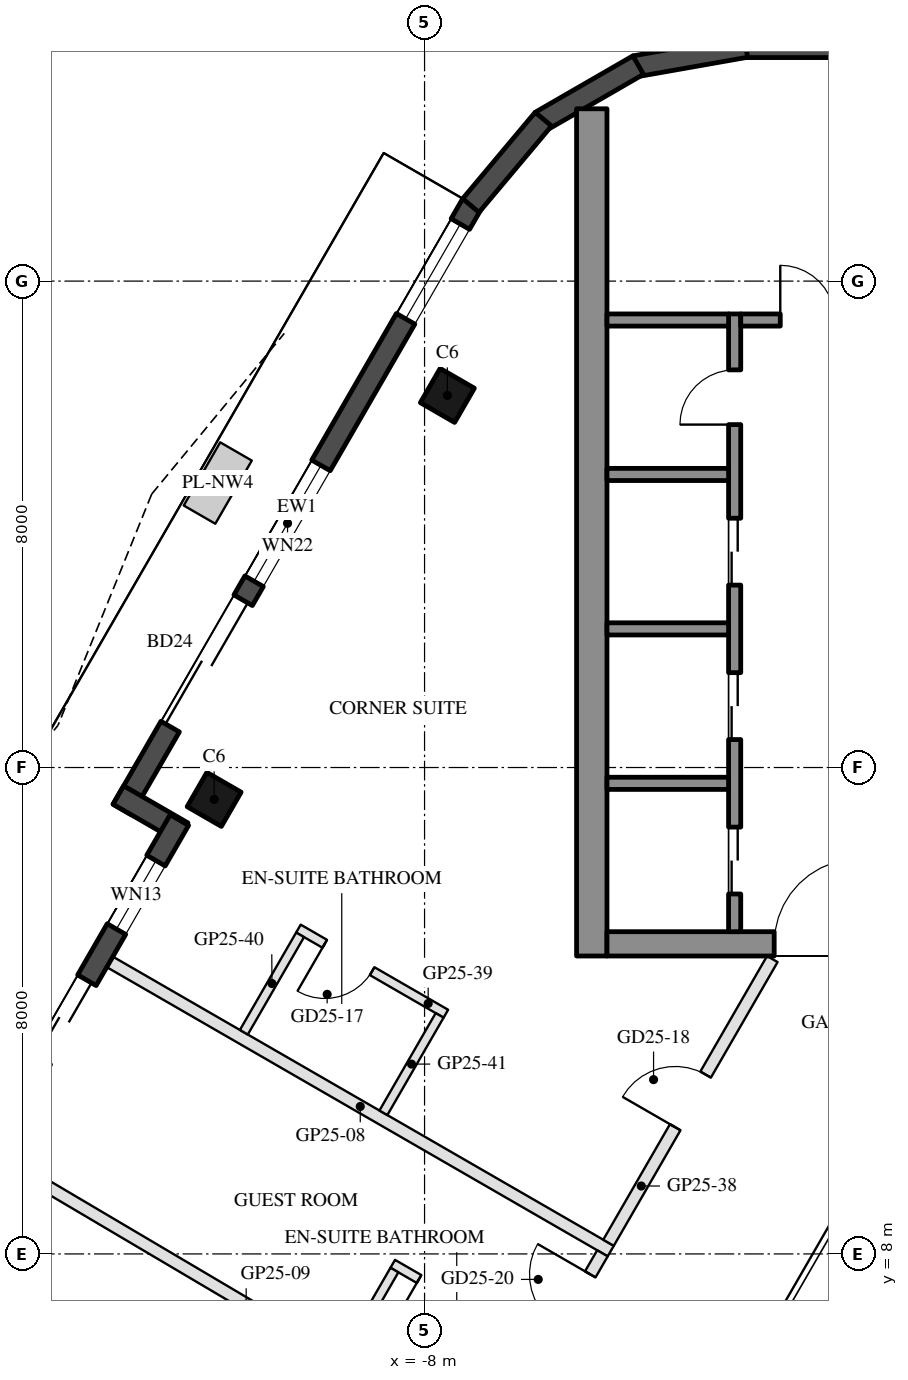
"""IFC4 building model, lengths in metres.
Left out: names, types, materials, properties, quantities, classifications, styles, units other than length and angle.
Written with IfcOpenShell. Run it as: python <this file> out.ifc"""

import sys

from ifc_helpers import new_model, si_unit, direction, frame, frame_2d, origin, origin_2d, place, context, subcontext, project, spatial, rectangle, hollow_rectangle, extrude, boolean, halfspace, element, fill, save


model = new_model("IFC4")
c1 = context("Model", 3, precision=1e-05, world=origin(), true_north=direction((0.0, 1.0)))
c2 = subcontext(c1, "Body", "Model", "MODEL_VIEW")
j1 = project(units=[si_unit("LENGTHUNIT", "METRE"), si_unit("PLANEANGLEUNIT", "RADIAN")], contexts=[c1])
p1 = place(None, origin())
s1 = spatial("IfcSite", under=j1, at=p1, CompositionType="ELEMENT")
p2 = place(p1, origin())
s2 = spatial("IfcBuilding", under=s1, at=p2, CompositionType="ELEMENT")
p3 = place(p2, frame((0.0, 0.0, 257.8)))
s3 = spatial("IfcBuildingStorey", under=s2, at=p3, CompositionType="ELEMENT", Elevation=257.8)
p4 = place(p3, frame((-7.625, 22.119, 0.0), z_axis=(0.0, 0.0, 1.0), x_axis=(0.5, 0.866025403784, 0.0)))
e1 = element("IfcColumn", 1, at=p4, inside=s3, PredefinedType="COLUMN", context=c2, shape_type="SweptSolid", body=[
    boolean("DIFFERENCE", extrude(hollow_rectangle(XDim=0.65, YDim=0.65, WallThickness=0.03, at=origin_2d()), origin(), (0.0, 0.0, 1.0), 3.7), halfspace(frame((0.0, 0.0, 0.047), z_axis=(0.0, 0.0, 1.0), x_axis=(1.0, 0.0, 0.0)), True)),
])
p5 = place(p3, frame((-11.461, 15.475, 0.0), z_axis=(0.0, 0.0, 1.0), x_axis=(0.5, 0.866025403784, 0.0)))
e2 = element("IfcColumn", 2, at=p5, inside=s3, PredefinedType="COLUMN", context=c2, shape_type="SweptSolid", body=[
    boolean("DIFFERENCE", extrude(hollow_rectangle(XDim=0.65, YDim=0.65, WallThickness=0.03, at=origin_2d()), origin(), (0.0, 0.0, 1.0), 3.7), halfspace(frame((0.0, 0.0, 0.04), z_axis=(0.0, 0.0, 1.0), x_axis=(1.0, 0.0, 0.0)), True)),
])
p6 = place(p3, frame((-7.221, 25.268, 0.0), z_axis=(0.0, 0.0, 1.0), x_axis=(-0.499999932627, -0.866025442683, 0.0)))
e3 = element("IfcWall", 3, at=p6, inside=s3, PredefinedType="SOLIDWALL", context=c2, shape_type="SweptSolid", body=[
    extrude(rectangle(XDim=11.5, YDim=0.35, at=frame_2d((5.75, 0.0))), origin(), (0.0, 0.0, 1.0), 3.55),
])
p7 = place(p6, frame((0.381, 0.0, 0.3)))
e4 = element("IfcOpeningElement", 4, at=p7, cuts=e3, PredefinedType="OPENING", context=c2, shape_type="SweptSolid", body=[
    extrude(rectangle(XDim=1.8, YDim=2.65, at=frame_2d((0.9, 1.325))), frame((0.0, 0.185, 0.0), z_axis=(0.0, -1.0, 0.0), x_axis=(1.0, 0.0, 0.0)), (0.0, 0.0, 1.0), 0.37),
])
p8 = place(p6, frame((7.525, 0.0, 0.0)))
e5 = element("IfcOpeningElement", 5, at=p8, cuts=e3, PredefinedType="OPENING", context=c2, shape_type="SweptSolid", body=[
    extrude(rectangle(XDim=2.4, YDim=2.4, at=frame_2d((1.2, 1.2))), frame((0.0, 0.185, 0.0), z_axis=(0.0, -1.0, 0.0), x_axis=(1.0, 0.0, 0.0)), (0.0, 0.0, 1.0), 0.37),
])
p9 = place(p6, frame((4.964, 0.0, 0.3)))
e6 = element("IfcOpeningElement", 6, at=p9, cuts=e3, PredefinedType="OPENING", context=c2, shape_type="SweptSolid", body=[
    extrude(rectangle(XDim=2.2, YDim=2.65, at=frame_2d((1.1, 1.325))), frame((0.0, 0.185, 0.0), z_axis=(0.0, -1.0, 0.0), x_axis=(1.0, 0.0, 0.0)), (0.0, 0.0, 1.0), 0.37),
])
p10 = place(p3, frame((-13.036, 15.548, 0.0), z_axis=(0.0, 0.0, 1.0), x_axis=(0.866005645448, -0.500034220881, 0.0)))
e7 = element("IfcWall", 7, at=p10, inside=s3, PredefinedType="SOLIDWALL", context=c2, shape_type="SweptSolid", body=[
    extrude(rectangle(XDim=1.22, YDim=0.35, at=frame_2d((0.61, 0.0))), origin(), (0.0, 0.0, 1.0), 3.55),
])
p11 = place(p3, frame((-12.032, 15.136, 0.0), z_axis=(0.0, 0.0, 1.0), x_axis=(-0.500005870429, -0.866022014464, 0.0)))
e8 = element("IfcWall", 8, at=p11, inside=s3, PredefinedType="SOLIDWALL", context=c2, shape_type="SweptSolid", body=[
    extrude(rectangle(XDim=6.512, YDim=0.35, at=frame_2d((3.256, 0.0))), origin(), (0.0, 0.0, 1.0), 3.55),
])
p12 = place(p11, frame((0.77, 0.0, 0.3)))
e9 = element("IfcOpeningElement", 9, at=p12, cuts=e8, PredefinedType="OPENING", context=c2, shape_type="SweptSolid", body=[
    extrude(rectangle(XDim=1.3, YDim=2.65, at=frame_2d((0.65, 1.325))), frame((0.0, 0.185, 0.0), z_axis=(0.0, -1.0, 0.0), x_axis=(1.0, 0.0, 0.0)), (0.0, 0.0, 1.0), 0.37),
])
p13 = place(p11, frame((3.042, 0.0, 0.0)))
e10 = element("IfcOpeningElement", 10, at=p13, cuts=e8, PredefinedType="OPENING", context=c2, shape_type="SweptSolid", body=[
    extrude(rectangle(XDim=1.5, YDim=2.4, at=frame_2d((0.75, 1.2))), frame((0.0, 0.185, 0.0), z_axis=(0.0, -1.0, 0.0), x_axis=(1.0, 0.0, 0.0)), (0.0, 0.0, 1.0), 0.37),
])
p14 = place(p11, frame((4.842, 0.0, 0.3)))
e11 = element("IfcOpeningElement", 11, at=p14, cuts=e8, PredefinedType="OPENING", context=c2, shape_type="SweptSolid", body=[
    extrude(rectangle(XDim=1.0, YDim=2.65, at=frame_2d((0.5, 1.325))), frame((0.0, 0.185, 0.0), z_axis=(0.0, -1.0, 0.0), x_axis=(1.0, 0.0, 0.0)), (0.0, 0.0, 1.0), 0.37),
])
p15 = place(p3, frame((2.747, 27.851, 0.0), z_axis=(0.0, 0.0, 1.0), x_axis=(-1.0, 0.0, 0.0)))
e12 = element("IfcWall", 12, at=p15, inside=s3, PredefinedType="SOLIDWALL", context=c2, shape_type="SweptSolid", body=[
    extrude(rectangle(XDim=5.495, YDim=0.35, at=frame_2d((2.747, 0.0))), origin(), (0.0, 0.0, 1.0), 3.55),
])
p16 = place(p3, frame((-2.717, 27.854, 0.0), z_axis=(0.0, 0.0, 1.0), x_axis=(-0.984795480386, -0.173717764815, 0.0)))
e13 = element("IfcWall", 13, at=p16, inside=s3, PredefinedType="SOLIDWALL", context=c2, shape_type="SweptSolid", body=[
    extrude(rectangle(XDim=1.855, YDim=0.35, at=frame_2d((0.928, 0.0))), origin(), (0.0, 0.0, 1.0), 3.55),
])
p17 = place(p3, frame((-4.487, 27.552, 0.0), z_axis=(0.0, 0.0, 1.0), x_axis=(-0.866080385203, -0.499904757295, 0.0)))
e14 = element("IfcWall", 14, at=p17, inside=s3, PredefinedType="SOLIDWALL", context=c2, shape_type="SweptSolid", body=[
    extrude(rectangle(XDim=1.855, YDim=0.35, at=frame_2d((0.927, 0.0))), origin(), (0.0, 0.0, 1.0), 3.55),
])
p18 = place(p3, frame((-6.046, 26.664, 0.0), z_axis=(0.0, 0.0, 1.0), x_axis=(-0.642756798522, -0.7660702957, 0.0)))
e15 = element("IfcWall", 15, at=p18, inside=s3, PredefinedType="SOLIDWALL", context=c2, shape_type="SweptSolid", body=[
    extrude(rectangle(XDim=1.855, YDim=0.35, at=frame_2d((0.928, 0.0))), origin(), (0.0, 0.0, 1.0), 3.55),
])
p19 = place(p3, frame((-5.25, 12.9, 0.0), z_axis=(0.0, 0.0, 1.0), x_axis=(0.0, 1.0, 0.0)))
e16 = element("IfcWall", 16, at=p19, inside=s3, PredefinedType="SHEAR", context=c2, shape_type="SweptSolid", body=[
    extrude(rectangle(XDim=13.934, YDim=0.5, at=frame_2d((6.967, 0.0))), origin(), (0.0, 0.0, 1.0), 3.5),
])
p20 = place(p3, frame((5.0, 13.1, 0.0), z_axis=(0.0, 0.0, 1.0), x_axis=(-1.0, 0.0, 0.0)))
e17 = element("IfcWall", 17, at=p20, inside=s3, PredefinedType="SHEAR", context=c2, shape_type="SweptSolid", body=[
    extrude(rectangle(XDim=10.0, YDim=0.4, at=frame_2d((5.0, 0.0))), origin(), (0.0, 0.0, 1.0), 3.5),
])
p21 = place(p20, frame((3.55, 0.0, 0.0)))
e18 = element("IfcOpeningElement", 18, at=p21, cuts=e17, PredefinedType="OPENING", context=c2, shape_type="SweptSolid", body=[
    extrude(rectangle(XDim=1.1, YDim=2.1, at=frame_2d((0.55, 1.05))), frame((0.0, 0.21, 0.0), z_axis=(0.0, -1.0, 0.0), x_axis=(1.0, 0.0, 0.0)), (0.0, 0.0, 1.0), 0.42),
])
p22 = place(p20, frame((5.85, 0.0, 0.0)))
e19 = element("IfcOpeningElement", 19, at=p22, cuts=e17, PredefinedType="OPENING", context=c2, shape_type="SweptSolid", body=[
    extrude(rectangle(XDim=1.4, YDim=2.1, at=frame_2d((0.7, 1.05))), frame((0.0, 0.21, 0.0), z_axis=(0.0, -1.0, 0.0), x_axis=(1.0, 0.0, 0.0)), (0.0, 0.0, 1.0), 0.42),
])
p23 = place(p3, frame((-2.9, 13.3, 0.0), z_axis=(0.0, 0.0, 1.0), x_axis=(0.0, 1.0, 0.0)))
e20 = element("IfcWall", 20, at=p23, inside=s3, PredefinedType="SHEAR", context=c2, shape_type="SweptSolid", body=[
    extrude(rectangle(XDim=10.16, YDim=0.2, at=frame_2d((5.08, 0.0))), origin(), (0.0, 0.0, 1.0), 3.5),
])
p24 = place(p23, frame((0.62, 0.0, 0.0)))
e21 = element("IfcOpeningElement", 21, at=p24, cuts=e20, PredefinedType="OPENING", context=c2, shape_type="SweptSolid", body=[
    extrude(rectangle(XDim=1.1, YDim=2.1, at=frame_2d((0.55, 1.05))), frame((0.0, 0.11, 0.0), z_axis=(0.0, -1.0, 0.0), x_axis=(1.0, 0.0, 0.0)), (0.0, 0.0, 1.0), 0.22),
])
p25 = place(p23, frame((3.16, 0.0, 0.0)))
e22 = element("IfcOpeningElement", 22, at=p25, cuts=e20, PredefinedType="OPENING", context=c2, shape_type="SweptSolid", body=[
    extrude(rectangle(XDim=1.1, YDim=2.1, at=frame_2d((0.55, 1.05))), frame((0.0, 0.11, 0.0), z_axis=(0.0, -1.0, 0.0), x_axis=(1.0, 0.0, 0.0)), (0.0, 0.0, 1.0), 0.22),
])
p26 = place(p23, frame((5.7, 0.0, 0.0)))
e23 = element("IfcOpeningElement", 23, at=p26, cuts=e20, PredefinedType="OPENING", context=c2, shape_type="SweptSolid", body=[
    extrude(rectangle(XDim=1.1, YDim=2.1, at=frame_2d((0.55, 1.05))), frame((0.0, 0.11, 0.0), z_axis=(0.0, -1.0, 0.0), x_axis=(1.0, 0.0, 0.0)), (0.0, 0.0, 1.0), 0.22),
])
p27 = place(p23, frame((8.34, 0.0, 0.0)))
e24 = element("IfcOpeningElement", 24, at=p27, cuts=e20, PredefinedType="OPENING", context=c2, shape_type="SweptSolid", body=[
    extrude(rectangle(XDim=0.9, YDim=2.1, at=frame_2d((0.45, 1.05))), frame((0.0, 0.11, 0.0), z_axis=(0.0, -1.0, 0.0), x_axis=(1.0, 0.0, 0.0)), (0.0, 0.0, 1.0), 0.22),
])
p28 = place(p3, frame((-0.4, 23.36, 0.0), z_axis=(0.0, 0.0, 1.0), x_axis=(-1.0, 0.0, 0.0)))
e25 = element("IfcWall", 25, at=p28, inside=s3, PredefinedType="SHEAR", context=c2, shape_type="SweptSolid", body=[
    extrude(rectangle(XDim=2.4, YDim=0.2, at=frame_2d((1.2, 0.0))), origin(), (0.0, 0.0, 1.0), 3.5),
])
p29 = place(p28, frame((0.85, 0.0, 0.0)))
e26 = element("IfcOpeningElement", 26, at=p29, cuts=e25, PredefinedType="OPENING", context=c2, shape_type="SweptSolid", body=[
    extrude(rectangle(XDim=0.9, YDim=2.1, at=frame_2d((0.45, 1.05))), frame((0.0, 0.11, 0.0), z_axis=(0.0, -1.0, 0.0), x_axis=(1.0, 0.0, 0.0)), (0.0, 0.0, 1.0), 0.22),
])
for number, where, z_axis, x_axis in (
    (27, (-3.0, 15.74, 0.0), (0.0, 0.0, 1.0), (-1.0, 0.0, 0.0)),
    (28, (-3.0, 18.28, 0.0), (0.0, 0.0, 1.0), (-1.0, 0.0, 0.0)),
    (29, (-3.0, 20.82, 0.0), (0.0, 0.0, 1.0), (-1.0, 0.0, 0.0)),
    (30, (-3.0, 23.36, 0.0), (0.0, 0.0, 1.0), (-1.0, 0.0, 0.0)),
):
    element("IfcWall", number, at=place(p3, frame(where, z_axis=z_axis, x_axis=x_axis)), inside=s3, PredefinedType="SHEAR", context=c2, shape_type="SweptSolid", body=[
        extrude(rectangle(XDim=2.0, YDim=0.2, at=frame_2d((1.0, 0.0))), origin(), (0.0, 0.0, 1.0), 3.5),
    ])
p30 = place(p3, frame((-13.177, 12.804, 0.0), z_axis=(0.0, 0.0, 1.0), x_axis=(0.866021901412, -0.500006066238, 0.0)))
e31 = element("IfcWall", 31, at=p30, inside=s3, PredefinedType="PARTITIONING", context=c2, shape_type="SweptSolid", body=[
    extrude(rectangle(XDim=9.513, YDim=0.2, at=frame_2d((4.757, 0.0))), origin(), (0.0, 0.0, 1.0), 3.16),
])
p31 = place(p3, frame((-15.029, 9.596, 0.0), z_axis=(0.0, 0.0, 1.0), x_axis=(0.860830464323, -0.508891846754, 0.0)))
e32 = element("IfcWall", 32, at=p31, inside=s3, PredefinedType="PARTITIONING", context=c2, shape_type="SweptSolid", body=[
    extrude(rectangle(XDim=9.513, YDim=0.2, at=frame_2d((4.757, 0.0))), origin(), (0.0, 0.0, 1.0), 3.16),
])
p32 = place(p3, frame((-4.975, 8.184, 0.0), z_axis=(0.0, 0.0, 1.0), x_axis=(0.499983925036, 0.86603468447, 0.0)))
e33 = element("IfcWall", 33, at=p32, inside=s3, PredefinedType="PARTITIONING", context=c2, shape_type="SweptSolid", body=[
    extrude(rectangle(XDim=5.388, YDim=0.2, at=frame_2d((2.694, 0.0))), origin(), (0.0, 0.0, 1.0), 3.0),
])
p33 = place(p32, frame((2.194, 0.0, 0.0)))
e34 = element("IfcOpeningElement", 34, at=p33, cuts=e33, PredefinedType="OPENING", context=c2, shape_type="SweptSolid", body=[
    extrude(rectangle(XDim=1.0, YDim=2.1, at=frame_2d((0.5, 1.05))), frame((0.0, 0.11, 0.0), z_axis=(0.0, -1.0, 0.0), x_axis=(1.0, 0.0, 0.0)), (0.0, 0.0, 1.0), 0.22),
])
p34 = place(p3, frame((-7.649, 11.951, 0.0), z_axis=(0.0, 0.0, 1.0), x_axis=(-0.865996816683, 0.500049511043, 0.0)))
e35 = element("IfcWall", 35, at=p34, inside=s3, PredefinedType="PARTITIONING", context=c2, shape_type="SweptSolid", body=[
    extrude(rectangle(XDim=2.8, YDim=0.15, at=frame_2d((1.4, 0.0))), origin(), (0.0, 0.0, 1.0), 3.55),
])
p35 = place(p34, frame((1.4, 0.0, 0.0)))
e36 = element("IfcOpeningElement", 36, at=p35, cuts=e35, PredefinedType="OPENING", context=c2, shape_type="SweptSolid", body=[
    extrude(rectangle(XDim=0.9, YDim=2.1, at=frame_2d((0.45, 1.05))), frame((0.0, 0.085, 0.0), z_axis=(0.0, -1.0, 0.0), x_axis=(1.0, 0.0, 0.0)), (0.0, 0.0, 1.0), 0.17),
])
for number, where, z_axis, x_axis in (
    (37, (-10.047, 13.248, 0.0), (0.0, 0.0, 1.0), (-0.5, -0.866, 0.0)),
    (38, (-7.752, 11.923, 0.0), (0.0, 0.0, 1.0), (-0.5, -0.866, 0.0)),
):
    element("IfcWall", number, at=place(p3, frame(where, z_axis=z_axis, x_axis=x_axis)), inside=s3, PredefinedType="PARTITIONING", context=c2, shape_type="SweptSolid", body=[
        extrude(rectangle(XDim=1.85, YDim=0.15, at=frame_2d((0.925, 0.0))), origin(), (0.0, 0.0, 1.0), 3.55),
    ])
p36 = place(p3, frame((-6.875, 4.892, 0.0), z_axis=(0.0, 0.0, 1.0), x_axis=(0.499945471869, 0.866056883327, 0.0)))
e39 = element("IfcWall", 39, at=p36, inside=s3, PredefinedType="PARTITIONING", context=c2, shape_type="SweptSolid", body=[
    extrude(rectangle(XDim=3.601, YDim=0.2, at=frame_2d((1.801, 0.0))), origin(), (0.0, 0.0, 1.0), 3.0),
])
p37 = place(p36, frame((2.201, 0.0, 0.0)))
e40 = element("IfcOpeningElement", 40, at=p37, cuts=e39, PredefinedType="OPENING", context=c2, shape_type="SweptSolid", body=[
    extrude(rectangle(XDim=1.0, YDim=2.1, at=frame_2d((0.5, 1.05))), frame((0.0, 0.11, 0.0), z_axis=(0.0, -1.0, 0.0), x_axis=(1.0, 0.0, 0.0)), (0.0, 0.0, 1.0), 0.22),
])
p38 = place(p3, frame((-6.098, 6.438, 0.0), z_axis=(0.0, 0.0, 1.0), x_axis=(-0.866018616679, 0.500011755427, 0.0)))
e41 = element("IfcWall", 41, at=p38, inside=s3, PredefinedType="PARTITIONING", context=c2, shape_type="SweptSolid", body=[
    extrude(rectangle(XDim=2.8, YDim=0.15, at=frame_2d((1.4, 0.0))), origin(), (0.0, 0.0, 1.0), 3.55),
])
p39 = place(p38, frame((1.4, 0.0, 0.0)))
e42 = element("IfcOpeningElement", 42, at=p39, cuts=e41, PredefinedType="OPENING", context=c2, shape_type="SweptSolid", body=[
    extrude(rectangle(XDim=0.9, YDim=2.1, at=frame_2d((0.45, 1.05))), frame((0.0, 0.085, 0.0), z_axis=(0.0, -1.0, 0.0), x_axis=(1.0, 0.0, 0.0)), (0.0, 0.0, 1.0), 0.17),
])
p40 = place(p3, frame((-8.496, 7.735, 0.0), z_axis=(0.0, 0.0, 1.0), x_axis=(-0.500021943523, -0.866012734315, 0.0)))
e43 = element("IfcWall", 43, at=p40, inside=s3, PredefinedType="PARTITIONING", context=c2, shape_type="SweptSolid", body=[
    extrude(rectangle(XDim=1.623, YDim=0.15, at=frame_2d((0.812, 0.0))), origin(), (0.0, 0.0, 1.0), 3.55),
])
p41 = place(p7, origin())
e44 = element("IfcWindow", 44, at=p41, inside=s3, PartitioningType="SINGLE_PANEL", PredefinedType="WINDOW", context=c2, shape_type="SweptSolid", body=[
    extrude(rectangle(XDim=1.8, YDim=2.65, at=frame_2d((0.9, 1.325))), frame((0.0, 0.03, 0.0), z_axis=(0.0, -1.0, 0.0), x_axis=(1.0, 0.0, 0.0)), (0.0, 0.0, 1.0), 0.06),
])
fill(e4, e44)
p42 = place(p8, frame((2.4, 0.0, 0.0), z_axis=(0.0, 0.0, 1.0), x_axis=(-1.0, 0.0, 0.0)))
e45 = element("IfcDoor", 45, at=p42, inside=s3, OperationType="SLIDING_TO_LEFT", PredefinedType="DOOR", context=c2, shape_type="SweptSolid", body=[
    extrude(rectangle(XDim=2.4, YDim=2.4, at=frame_2d((1.2, 1.2))), frame((0.0, 0.025, 0.0), z_axis=(0.0, -1.0, 0.0), x_axis=(1.0, 0.0, 0.0)), (0.0, 0.0, 1.0), 0.05),
])
fill(e5, e45)
p43 = place(p9, origin())
e46 = element("IfcWindow", 46, at=p43, inside=s3, PartitioningType="SINGLE_PANEL", PredefinedType="WINDOW", context=c2, shape_type="SweptSolid", body=[
    extrude(rectangle(XDim=2.2, YDim=2.65, at=frame_2d((1.1, 1.325))), frame((0.0, 0.03, 0.0), z_axis=(0.0, -1.0, 0.0), x_axis=(1.0, 0.0, 0.0)), (0.0, 0.0, 1.0), 0.06),
])
fill(e6, e46)
p44 = place(p12, origin())
e47 = element("IfcWindow", 47, at=p44, inside=s3, PartitioningType="SINGLE_PANEL", PredefinedType="WINDOW", context=c2, shape_type="SweptSolid", body=[
    extrude(rectangle(XDim=1.3, YDim=2.65, at=frame_2d((0.65, 1.325))), frame((0.0, 0.03, 0.0), z_axis=(0.0, -1.0, 0.0), x_axis=(1.0, 0.0, 0.0)), (0.0, 0.0, 1.0), 0.06),
])
fill(e9, e47)
p45 = place(p13, frame((1.5, 0.0, 0.0), z_axis=(0.0, 0.0, 1.0), x_axis=(-1.0, 0.0, 0.0)))
e48 = element("IfcDoor", 48, at=p45, inside=s3, OperationType="SLIDING_TO_LEFT", PredefinedType="DOOR", context=c2, shape_type="SweptSolid", body=[
    extrude(rectangle(XDim=1.5, YDim=2.4, at=frame_2d((0.75, 1.2))), frame((0.0, 0.025, 0.0), z_axis=(0.0, -1.0, 0.0), x_axis=(1.0, 0.0, 0.0)), (0.0, 0.0, 1.0), 0.05),
])
fill(e10, e48)
p46 = place(p24, origin())
e49 = element("IfcDoor", 49, at=p46, inside=s3, OperationType="DOUBLE_DOOR_SLIDING", PredefinedType="DOOR", context=c2, shape_type="SweptSolid", body=[
    extrude(rectangle(XDim=1.1, YDim=2.1, at=frame_2d((0.55, 1.05))), frame((0.0, 0.025, 0.0), z_axis=(0.0, -1.0, 0.0), x_axis=(1.0, 0.0, 0.0)), (0.0, 0.0, 1.0), 0.05),
])
fill(e21, e49)
p47 = place(p25, origin())
e50 = element("IfcDoor", 50, at=p47, inside=s3, OperationType="DOUBLE_DOOR_SLIDING", PredefinedType="DOOR", context=c2, shape_type="SweptSolid", body=[
    extrude(rectangle(XDim=1.1, YDim=2.1, at=frame_2d((0.55, 1.05))), frame((0.0, 0.025, 0.0), z_axis=(0.0, -1.0, 0.0), x_axis=(1.0, 0.0, 0.0)), (0.0, 0.0, 1.0), 0.05),
])
fill(e22, e50)
p48 = place(p26, origin())
e51 = element("IfcDoor", 51, at=p48, inside=s3, OperationType="DOUBLE_DOOR_SLIDING", PredefinedType="DOOR", context=c2, shape_type="SweptSolid", body=[
    extrude(rectangle(XDim=1.1, YDim=2.1, at=frame_2d((0.55, 1.05))), frame((0.0, 0.025, 0.0), z_axis=(0.0, -1.0, 0.0), x_axis=(1.0, 0.0, 0.0)), (0.0, 0.0, 1.0), 0.05),
])
fill(e23, e51)
p49 = place(p27, origin())
e52 = element("IfcDoor", 52, at=p49, inside=s3, OperationType="SINGLE_SWING_LEFT", PredefinedType="DOOR", context=c2, shape_type="SweptSolid", body=[
    extrude(rectangle(XDim=0.9, YDim=2.1, at=frame_2d((0.45, 1.05))), frame((0.0, 0.025, 0.0), z_axis=(0.0, -1.0, 0.0), x_axis=(1.0, 0.0, 0.0)), (0.0, 0.0, 1.0), 0.05),
])
fill(e24, e52)
p50 = place(p29, frame((0.9, 0.0, 0.0), z_axis=(0.0, 0.0, 1.0), x_axis=(-1.0, 0.0, 0.0)))
e53 = element("IfcDoor", 53, at=p50, inside=s3, OperationType="SINGLE_SWING_LEFT", PredefinedType="DOOR", context=c2, shape_type="SweptSolid", body=[
    extrude(rectangle(XDim=0.9, YDim=2.1, at=frame_2d((0.45, 1.05))), frame((0.0, 0.025, 0.0), z_axis=(0.0, -1.0, 0.0), x_axis=(1.0, 0.0, 0.0)), (0.0, 0.0, 1.0), 0.05),
])
fill(e26, e53)
p51 = place(p22, frame((1.4, 0.0, 0.0), z_axis=(0.0, 0.0, 1.0), x_axis=(-1.0, 0.0, 0.0)))
e54 = element("IfcDoor", 54, at=p51, inside=s3, OperationType="DOUBLE_DOOR_SINGLE_SWING", PredefinedType="DOOR", context=c2, shape_type="SweptSolid", body=[
    extrude(rectangle(XDim=1.4, YDim=2.1, at=frame_2d((0.7, 1.05))), frame((0.0, 0.025, 0.0), z_axis=(0.0, -1.0, 0.0), x_axis=(1.0, 0.0, 0.0)), (0.0, 0.0, 1.0), 0.05),
])
fill(e19, e54)
p52 = place(p35, origin())
e55 = element("IfcDoor", 55, at=p52, inside=s3, OperationType="SINGLE_SWING_RIGHT", PredefinedType="DOOR", context=c2, shape_type="SweptSolid", body=[
    extrude(rectangle(XDim=0.9, YDim=2.1, at=frame_2d((0.45, 1.05))), frame((0.0, 0.025, 0.0), z_axis=(0.0, -1.0, 0.0), x_axis=(1.0, 0.0, 0.0)), (0.0, 0.0, 1.0), 0.05),
])
fill(e36, e55)
p53 = place(p33, origin())
e56 = element("IfcDoor", 56, at=p53, inside=s3, OperationType="SINGLE_SWING_LEFT", PredefinedType="DOOR", context=c2, shape_type="SweptSolid", body=[
    extrude(rectangle(XDim=1.0, YDim=2.1, at=frame_2d((0.5, 1.05))), frame((0.0, 0.025, 0.0), z_axis=(0.0, -1.0, 0.0), x_axis=(1.0, 0.0, 0.0)), (0.0, 0.0, 1.0), 0.05),
])
fill(e34, e56)
p54 = place(p39, origin())
e57 = element("IfcDoor", 57, at=p54, inside=s3, OperationType="SINGLE_SWING_RIGHT", PredefinedType="DOOR", context=c2, shape_type="SweptSolid", body=[
    extrude(rectangle(XDim=0.9, YDim=2.1, at=frame_2d((0.45, 1.05))), frame((0.0, 0.025, 0.0), z_axis=(0.0, -1.0, 0.0), x_axis=(1.0, 0.0, 0.0)), (0.0, 0.0, 1.0), 0.05),
])
fill(e42, e57)
p55 = place(p37, origin())
e58 = element("IfcDoor", 58, at=p55, inside=s3, OperationType="SINGLE_SWING_RIGHT", PredefinedType="DOOR", context=c2, shape_type="SweptSolid", body=[
    extrude(rectangle(XDim=1.0, YDim=2.1, at=frame_2d((0.5, 1.05))), frame((0.0, 0.025, 0.0), z_axis=(0.0, -1.0, 0.0), x_axis=(1.0, 0.0, 0.0)), (0.0, 0.0, 1.0), 0.05),
])
fill(e40, e58)
save(model, sys.argv[1])
